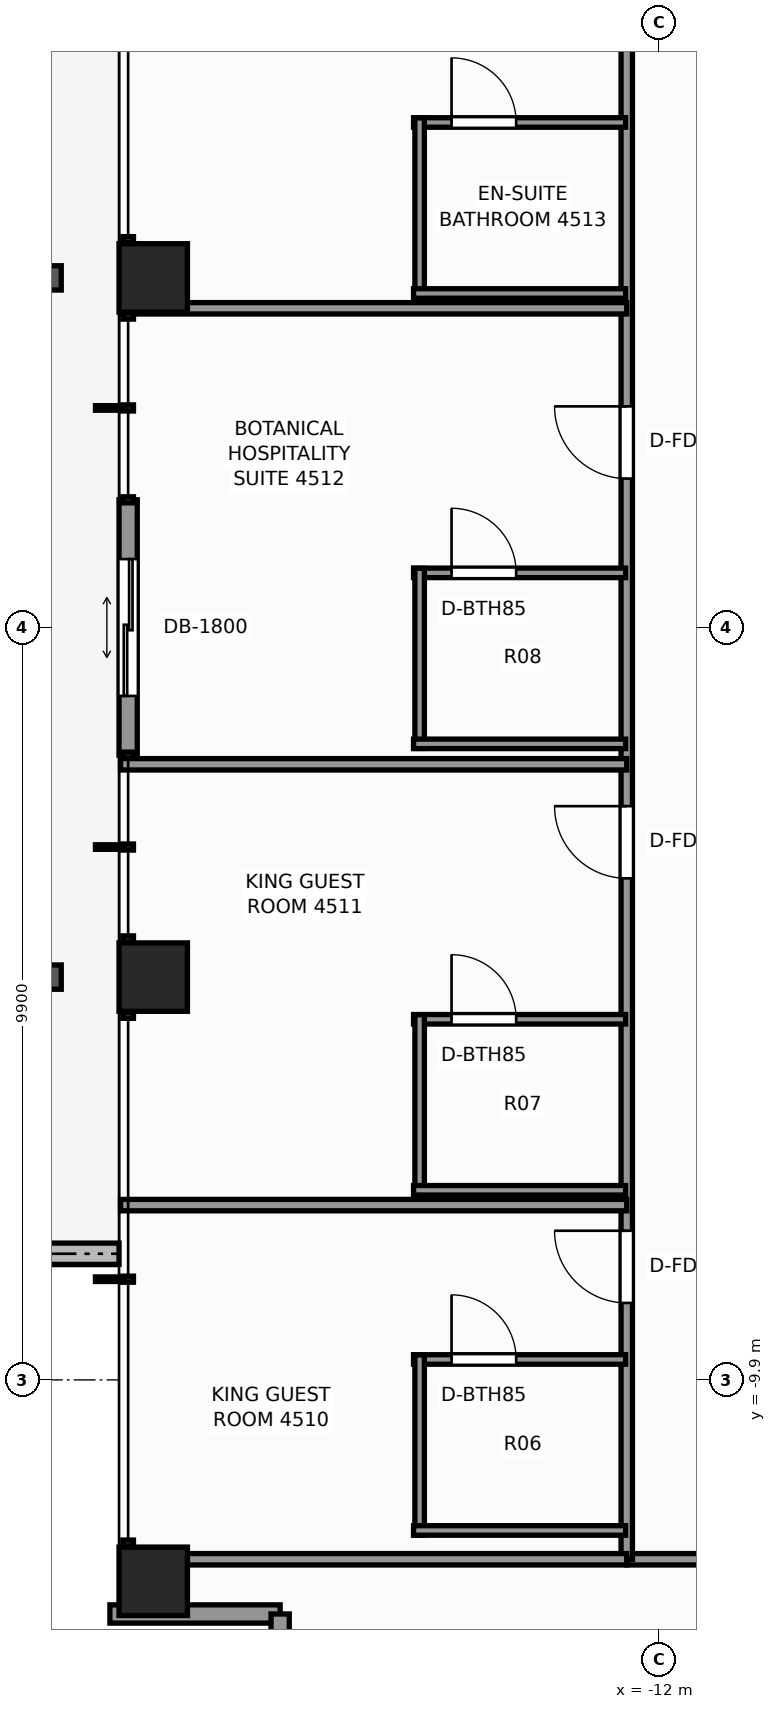
"""IFC4 building model, lengths in metres.
Left out: names, types, materials, properties, quantities, classifications, styles, units other than length and angle.
Written with IfcOpenShell. Run it as: python <this file> out.ifc"""

import sys

from ifc_helpers import new_model, si_unit, direction, frame, frame_2d, origin, origin_2d, place, context, subcontext, project, spatial, rectangle, extrude, element, fill, save


model = new_model("IFC4")
c1 = context("Model", 3, precision=1e-05, world=origin(), true_north=direction((0.0, 1.0)))
c2 = subcontext(c1, "Body", "Model", "MODEL_VIEW")
j1 = project(units=[si_unit("LENGTHUNIT", "METRE"), si_unit("PLANEANGLEUNIT", "RADIAN")], contexts=[c1])
p1 = place(None, origin())
s1 = spatial("IfcSite", under=j1, at=p1, CompositionType="ELEMENT")
p2 = place(p1, origin())
s2 = spatial("IfcBuilding", under=s1, at=p2, CompositionType="ELEMENT")
p3 = place(p2, frame((0.0, 0.0, 156.9)))
s3 = spatial("IfcBuildingStorey", under=s2, at=p3, CompositionType="ELEMENT", Elevation=156.9)
for number, where, z_axis, x_axis in (
    (1, (-18.65, -12.55, 0.0), (0.0, 0.0, 1.0), (1.0, 0.0, 0.0)),
    (2, (-18.65, -4.6, 0.0), (0.0, 0.0, 1.0), (1.0, 0.0, 0.0)),
    (3, (-18.65, 4.6, 0.0), (0.0, 0.0, 1.0), (1.0, 0.0, 0.0)),
):
    element("IfcColumn", number, at=place(p3, frame(where, z_axis=z_axis, x_axis=x_axis)), inside=s3, PredefinedType="COLUMN", context=c2, shape_type="SweptSolid", body=[
        extrude(rectangle(XDim=0.9, YDim=0.9, at=origin_2d()), origin(), (0.0, 0.0, 1.0), 3.3),
    ])
p4 = place(p3, frame((-20.36, -8.24, -0.02), z_axis=(0.0, 0.0, 1.0), x_axis=(1.0, 0.0, 0.0)))
e4 = element("IfcWall", 4, at=p4, inside=s3, PredefinedType="PARAPET", context=c2, shape_type="SweptSolid", body=[
    extrude(rectangle(XDim=1.26, YDim=0.28, at=frame_2d((0.63, 0.0))), origin(), (0.0, 0.0, 1.0), 0.42),
])
p5 = place(p3, frame((-18.98, -1.68, 0.0), z_axis=(0.0, 0.0, 1.0), x_axis=(0.0, 1.0, 0.0)))
e5 = element("IfcWall", 5, at=p5, inside=s3, PredefinedType="STANDARD", context=c2, shape_type="SweptSolid", body=[
    extrude(rectangle(XDim=3.36, YDim=0.24, at=frame_2d((1.68, 0.0))), origin(), (0.0, 0.0, 1.0), 3.1),
])
p6 = place(p5, frame((0.78, 0.0, 0.0)))
e6 = element("IfcOpeningElement", 6, at=p6, cuts=e5, PredefinedType="OPENING", context=c2, shape_type="SweptSolid", body=[
    extrude(rectangle(XDim=1.8, YDim=2.2, at=frame_2d((0.9, 1.1))), frame((0.0, 0.13, 0.0), z_axis=(0.0, -1.0, 0.0), x_axis=(1.0, 0.0, 0.0)), (0.0, 0.0, 1.0), 0.26),
])
p7 = place(p3, frame((-16.98, -12.98, 0.0), z_axis=(0.0, 0.0, 1.0), x_axis=(-1.0, 0.0, 0.0)))
e7 = element("IfcWall", 7, at=p7, inside=s3, PredefinedType="STANDARD", context=c2, shape_type="SweptSolid", body=[
    extrude(rectangle(XDim=2.24, YDim=0.24, at=frame_2d((1.12, 0.0))), origin(), (0.0, 0.0, 1.0), 2.483),
])
p8 = place(p3, frame((-16.98, -15.22, 0.0), z_axis=(0.0, 0.0, 1.0), x_axis=(0.0, 1.0, 0.0)))
e8 = element("IfcWall", 8, at=p8, inside=s3, PredefinedType="STANDARD", context=c2, shape_type="SweptSolid", body=[
    extrude(rectangle(XDim=2.24, YDim=0.24, at=frame_2d((1.12, 0.0))), origin(), (0.0, 0.0, 1.0), 2.483),
])
p9 = place(p8, frame((0.45, 0.0, 0.65)))
e9 = element("IfcOpeningElement", 9, at=p9, cuts=e8, PredefinedType="OPENING", context=c2, shape_type="SweptSolid", body=[
    extrude(rectangle(XDim=1.1, YDim=1.45, at=frame_2d((0.55, 0.725))), frame((0.0, 0.13, 0.0), z_axis=(0.0, -1.0, 0.0), x_axis=(1.0, 0.0, 0.0)), (0.0, 0.0, 1.0), 0.26),
])
p10 = place(p3, frame((-12.42, -12.26, 0.0), z_axis=(0.0, 0.0, 1.0), x_axis=(1.0, 0.0, 0.0)))
e10 = element("IfcWall", 10, at=p10, inside=s3, PredefinedType="PARTITIONING", context=c2, shape_type="SweptSolid", body=[
    extrude(rectangle(XDim=24.84, YDim=0.15, at=frame_2d((12.42, 0.0))), origin(), (0.0, 0.0, 1.0), 2.389),
])
p11 = place(p10, frame((3.542, 0.0, 0.0)))
e11 = element("IfcOpeningElement", 11, at=p11, cuts=e10, PredefinedType="OPENING", context=c2, shape_type="SweptSolid", body=[
    extrude(rectangle(XDim=0.9, YDim=2.06, at=frame_2d((0.45, 1.03))), frame((0.0, 0.085, 0.0), z_axis=(0.0, -1.0, 0.0), x_axis=(1.0, 0.0, 0.0)), (0.0, 0.0, 1.0), 0.17),
])
p12 = place(p10, frame((5.877, 0.0, 0.0)))
e12 = element("IfcOpeningElement", 12, at=p12, cuts=e10, PredefinedType="OPENING", context=c2, shape_type="SweptSolid", body=[
    extrude(rectangle(XDim=0.9, YDim=2.06, at=frame_2d((0.45, 1.03))), frame((0.0, 0.085, 0.0), z_axis=(0.0, -1.0, 0.0), x_axis=(1.0, 0.0, 0.0)), (0.0, 0.0, 1.0), 0.17),
])
p13 = place(p10, frame((9.693, 0.0, 0.0)))
e13 = element("IfcOpeningElement", 13, at=p13, cuts=e10, PredefinedType="OPENING", context=c2, shape_type="SweptSolid", body=[
    extrude(rectangle(XDim=0.9, YDim=2.06, at=frame_2d((0.45, 1.03))), frame((0.0, 0.085, 0.0), z_axis=(0.0, -1.0, 0.0), x_axis=(1.0, 0.0, 0.0)), (0.0, 0.0, 1.0), 0.17),
])
p14 = place(p10, frame((13.308, 0.0, 0.0)))
e14 = element("IfcOpeningElement", 14, at=p14, cuts=e10, PredefinedType="OPENING", context=c2, shape_type="SweptSolid", body=[
    extrude(rectangle(XDim=0.95, YDim=2.06, at=frame_2d((0.475, 1.03))), frame((0.0, 0.085, 0.0), z_axis=(0.0, -1.0, 0.0), x_axis=(1.0, 0.0, 0.0)), (0.0, 0.0, 1.0), 0.17),
])
p15 = place(p10, frame((18.063, 0.0, 0.0)))
e15 = element("IfcOpeningElement", 15, at=p15, cuts=e10, PredefinedType="OPENING", context=c2, shape_type="SweptSolid", body=[
    extrude(rectangle(XDim=0.9, YDim=2.06, at=frame_2d((0.45, 1.03))), frame((0.0, 0.085, 0.0), z_axis=(0.0, -1.0, 0.0), x_axis=(1.0, 0.0, 0.0)), (0.0, 0.0, 1.0), 0.17),
])
p16 = place(p10, frame((20.259, 0.0, 0.0)))
e16 = element("IfcOpeningElement", 16, at=p16, cuts=e10, PredefinedType="OPENING", context=c2, shape_type="SweptSolid", body=[
    extrude(rectangle(XDim=0.95, YDim=2.06, at=frame_2d((0.475, 1.03))), frame((0.0, 0.085, 0.0), z_axis=(0.0, -1.0, 0.0), x_axis=(1.0, 0.0, 0.0)), (0.0, 0.0, 1.0), 0.17),
])
p17 = place(p3, frame((-12.42, -12.26, 0.0), z_axis=(0.0, 0.0, 1.0), x_axis=(0.0, 1.0, 0.0)))
e17 = element("IfcWall", 17, at=p17, inside=s3, PredefinedType="PARTITIONING", context=c2, shape_type="SweptSolid", body=[
    extrude(rectangle(XDim=24.84, YDim=0.15, at=frame_2d((12.42, 0.0))), origin(), (0.0, 0.0, 1.0), 2.389),
])
p18 = place(p17, frame((3.373, 0.0, 0.0)))
e18 = element("IfcOpeningElement", 18, at=p18, cuts=e17, PredefinedType="OPENING", context=c2, shape_type="SweptSolid", body=[
    extrude(rectangle(XDim=0.95, YDim=2.06, at=frame_2d((0.475, 1.03))), frame((0.0, 0.085, 0.0), z_axis=(0.0, -1.0, 0.0), x_axis=(1.0, 0.0, 0.0)), (0.0, 0.0, 1.0), 0.17),
])
p19 = place(p17, frame((8.959, 0.0, 0.0)))
e19 = element("IfcOpeningElement", 19, at=p19, cuts=e17, PredefinedType="OPENING", context=c2, shape_type="SweptSolid", body=[
    extrude(rectangle(XDim=0.95, YDim=2.06, at=frame_2d((0.475, 1.03))), frame((0.0, 0.085, 0.0), z_axis=(0.0, -1.0, 0.0), x_axis=(1.0, 0.0, 0.0)), (0.0, 0.0, 1.0), 0.17),
])
p20 = place(p17, frame((14.219, 0.0, 0.0)))
e20 = element("IfcOpeningElement", 20, at=p20, cuts=e17, PredefinedType="OPENING", context=c2, shape_type="SweptSolid", body=[
    extrude(rectangle(XDim=0.95, YDim=2.06, at=frame_2d((0.475, 1.03))), frame((0.0, 0.085, 0.0), z_axis=(0.0, -1.0, 0.0), x_axis=(1.0, 0.0, 0.0)), (0.0, 0.0, 1.0), 0.17),
])
p21 = place(p17, frame((20.117, 0.0, 0.0)))
e21 = element("IfcOpeningElement", 21, at=p21, cuts=e17, PredefinedType="OPENING", context=c2, shape_type="SweptSolid", body=[
    extrude(rectangle(XDim=0.95, YDim=2.06, at=frame_2d((0.475, 1.03))), frame((0.0, 0.085, 0.0), z_axis=(0.0, -1.0, 0.0), x_axis=(1.0, 0.0, 0.0)), (0.0, 0.0, 1.0), 0.17),
])
p22 = place(p3, frame((-19.08, -12.26, 0.0), z_axis=(0.0, 0.0, 1.0), x_axis=(1.0, 0.0, 0.0)))
e22 = element("IfcWall", 22, at=p22, inside=s3, PredefinedType="PARTITIONING", context=c2, shape_type="SweptSolid", body=[
    extrude(rectangle(XDim=6.66, YDim=0.15, at=frame_2d((3.33, 0.0))), origin(), (0.0, 0.0, 1.0), 2.389),
])
p23 = place(p3, frame((-19.08, -7.6, 0.0), z_axis=(0.0, 0.0, 1.0), x_axis=(1.0, 0.0, 0.0)))
e23 = element("IfcWall", 23, at=p23, inside=s3, PredefinedType="PARTITIONING", context=c2, shape_type="SweptSolid", body=[
    extrude(rectangle(XDim=6.66, YDim=0.15, at=frame_2d((3.33, 0.0))), origin(), (0.0, 0.0, 1.0), 2.473),
])
p24 = place(p3, frame((-15.225, -9.631, 0.0), z_axis=(0.0, 0.0, 1.0), x_axis=(1.0, 0.0, 0.0)))
e24 = element("IfcWall", 24, at=p24, inside=s3, PredefinedType="PARTITIONING", context=c2, shape_type="SweptSolid", body=[
    extrude(rectangle(XDim=2.79, YDim=0.125, at=frame_2d((1.395, 0.0))), origin(), (0.0, 0.0, 1.0), 3.1),
])
p25 = place(p24, frame((0.5, 0.0, 0.0)))
e25 = element("IfcOpeningElement", 25, at=p25, cuts=e24, PredefinedType="OPENING", context=c2, shape_type="SweptSolid", body=[
    extrude(rectangle(XDim=0.85, YDim=2.03, at=frame_2d((0.425, 1.015))), frame((0.0, 0.073, 0.0), z_axis=(0.0, -1.0, 0.0), x_axis=(1.0, 0.0, 0.0)), (0.0, 0.0, 1.0), 0.145),
])
p26 = place(p3, frame((-15.145, -11.941, 0.0), z_axis=(0.0, 0.0, 1.0), x_axis=(0.0, 1.0, 0.0)))
e26 = element("IfcWall", 26, at=p26, inside=s3, PredefinedType="PARTITIONING", context=c2, shape_type="SweptSolid", body=[
    extrude(rectangle(XDim=2.37, YDim=0.125, at=frame_2d((1.185, 0.0))), origin(), (0.0, 0.0, 1.0), 2.389),
])
p27 = place(p3, frame((-15.225, -11.881, 0.0), z_axis=(0.0, 0.0, 1.0), x_axis=(1.0, 0.0, 0.0)))
e27 = element("IfcWall", 27, at=p27, inside=s3, PredefinedType="PARTITIONING", context=c2, shape_type="SweptSolid", body=[
    extrude(rectangle(XDim=2.79, YDim=0.125, at=frame_2d((1.395, 0.0))), origin(), (0.0, 0.0, 1.0), 3.1),
])
p28 = place(p3, frame((-19.08, -1.8, 0.0), z_axis=(0.0, 0.0, 1.0), x_axis=(1.0, 0.0, 0.0)))
e28 = element("IfcWall", 28, at=p28, inside=s3, PredefinedType="PARTITIONING", context=c2, shape_type="SweptSolid", body=[
    extrude(rectangle(XDim=6.66, YDim=0.15, at=frame_2d((3.33, 0.0))), origin(), (0.0, 0.0, 1.0), 2.473),
])
p29 = place(p3, frame((-15.225, -5.155, 0.0), z_axis=(0.0, 0.0, 1.0), x_axis=(1.0, 0.0, 0.0)))
e29 = element("IfcWall", 29, at=p29, inside=s3, PredefinedType="PARTITIONING", context=c2, shape_type="SweptSolid", body=[
    extrude(rectangle(XDim=2.79, YDim=0.125, at=frame_2d((1.395, 0.0))), origin(), (0.0, 0.0, 1.0), 3.1),
])
p30 = place(p29, frame((0.5, 0.0, 0.0)))
e30 = element("IfcOpeningElement", 30, at=p30, cuts=e29, PredefinedType="OPENING", context=c2, shape_type="SweptSolid", body=[
    extrude(rectangle(XDim=0.85, YDim=2.03, at=frame_2d((0.425, 1.015))), frame((0.0, 0.073, 0.0), z_axis=(0.0, -1.0, 0.0), x_axis=(1.0, 0.0, 0.0)), (0.0, 0.0, 1.0), 0.145),
])
p31 = place(p3, frame((-15.145, -7.465, 0.0), z_axis=(0.0, 0.0, 1.0), x_axis=(0.0, 1.0, 0.0)))
e31 = element("IfcWall", 31, at=p31, inside=s3, PredefinedType="PARTITIONING", context=c2, shape_type="SweptSolid", body=[
    extrude(rectangle(XDim=2.37, YDim=0.125, at=frame_2d((1.185, 0.0))), origin(), (0.0, 0.0, 1.0), 3.1),
])
p32 = place(p3, frame((-15.225, -7.405, 0.0), z_axis=(0.0, 0.0, 1.0), x_axis=(1.0, 0.0, 0.0)))
e32 = element("IfcWall", 32, at=p32, inside=s3, PredefinedType="PARTITIONING", context=c2, shape_type="SweptSolid", body=[
    extrude(rectangle(XDim=2.79, YDim=0.125, at=frame_2d((1.395, 0.0))), origin(), (0.0, 0.0, 1.0), 3.1),
])
p33 = place(p3, frame((-19.08, 4.2, 0.0), z_axis=(0.0, 0.0, 1.0), x_axis=(1.0, 0.0, 0.0)))
e33 = element("IfcWall", 33, at=p33, inside=s3, PredefinedType="PARTITIONING", context=c2, shape_type="SweptSolid", body=[
    extrude(rectangle(XDim=6.66, YDim=0.15, at=frame_2d((3.33, 0.0))), origin(), (0.0, 0.0, 1.0), 2.473),
])
p34 = place(p3, frame((-15.225, 0.719, 0.0), z_axis=(0.0, 0.0, 1.0), x_axis=(1.0, 0.0, 0.0)))
e34 = element("IfcWall", 34, at=p34, inside=s3, PredefinedType="PARTITIONING", context=c2, shape_type="SweptSolid", body=[
    extrude(rectangle(XDim=2.79, YDim=0.125, at=frame_2d((1.395, 0.0))), origin(), (0.0, 0.0, 1.0), 3.1),
])
p35 = place(p34, frame((0.5, 0.0, 0.0)))
e35 = element("IfcOpeningElement", 35, at=p35, cuts=e34, PredefinedType="OPENING", context=c2, shape_type="SweptSolid", body=[
    extrude(rectangle(XDim=0.85, YDim=2.03, at=frame_2d((0.425, 1.015))), frame((0.0, 0.073, 0.0), z_axis=(0.0, -1.0, 0.0), x_axis=(1.0, 0.0, 0.0)), (0.0, 0.0, 1.0), 0.145),
])
p36 = place(p3, frame((-15.145, -1.591, 0.0), z_axis=(0.0, 0.0, 1.0), x_axis=(0.0, 1.0, 0.0)))
e36 = element("IfcWall", 36, at=p36, inside=s3, PredefinedType="PARTITIONING", context=c2, shape_type="SweptSolid", body=[
    extrude(rectangle(XDim=2.37, YDim=0.125, at=frame_2d((1.185, 0.0))), origin(), (0.0, 0.0, 1.0), 2.625),
])
p37 = place(p3, frame((-15.225, -1.531, 0.0), z_axis=(0.0, 0.0, 1.0), x_axis=(1.0, 0.0, 0.0)))
e37 = element("IfcWall", 37, at=p37, inside=s3, PredefinedType="PARTITIONING", context=c2, shape_type="SweptSolid", body=[
    extrude(rectangle(XDim=2.79, YDim=0.125, at=frame_2d((1.395, 0.0))), origin(), (0.0, 0.0, 1.0), 3.1),
])
p38 = place(p3, frame((-15.225, 6.645, 0.0), z_axis=(0.0, 0.0, 1.0), x_axis=(1.0, 0.0, 0.0)))
e38 = element("IfcWall", 38, at=p38, inside=s3, PredefinedType="PARTITIONING", context=c2, shape_type="SweptSolid", body=[
    extrude(rectangle(XDim=2.79, YDim=0.125, at=frame_2d((1.395, 0.0))), origin(), (0.0, 0.0, 1.0), 3.1),
])
p39 = place(p38, frame((0.5, 0.0, 0.0)))
e39 = element("IfcOpeningElement", 39, at=p39, cuts=e38, PredefinedType="OPENING", context=c2, shape_type="SweptSolid", body=[
    extrude(rectangle(XDim=0.85, YDim=2.03, at=frame_2d((0.425, 1.015))), frame((0.0, 0.073, 0.0), z_axis=(0.0, -1.0, 0.0), x_axis=(1.0, 0.0, 0.0)), (0.0, 0.0, 1.0), 0.145),
])
p40 = place(p3, frame((-15.145, 4.335, 0.0), z_axis=(0.0, 0.0, 1.0), x_axis=(0.0, 1.0, 0.0)))
e40 = element("IfcWall", 40, at=p40, inside=s3, PredefinedType="PARTITIONING", context=c2, shape_type="SweptSolid", body=[
    extrude(rectangle(XDim=2.37, YDim=0.125, at=frame_2d((1.185, 0.0))), origin(), (0.0, 0.0, 1.0), 2.389),
])
p41 = place(p3, frame((-15.225, 4.395, 0.0), z_axis=(0.0, 0.0, 1.0), x_axis=(1.0, 0.0, 0.0)))
e41 = element("IfcWall", 41, at=p41, inside=s3, PredefinedType="PARTITIONING", context=c2, shape_type="SweptSolid", body=[
    extrude(rectangle(XDim=2.79, YDim=0.125, at=frame_2d((1.395, 0.0))), origin(), (0.0, 0.0, 1.0), 2.389),
])
p42 = place(p6, origin())
e42 = element("IfcDoor", 42, at=p42, inside=s3, OperationType="DOUBLE_DOOR_SLIDING", PredefinedType="DOOR", context=c2, shape_type="SweptSolid", body=[
    extrude(rectangle(XDim=1.8, YDim=2.2, at=frame_2d((0.9, 1.1))), frame((0.0, 0.025, 0.0), z_axis=(0.0, -1.0, 0.0), x_axis=(1.0, 0.0, 0.0)), (0.0, 0.0, 1.0), 0.05),
])
fill(e6, e42)
p43 = place(p25, origin())
e43 = element("IfcDoor", 43, at=p43, inside=s3, OperationType="SINGLE_SWING_LEFT", PredefinedType="DOOR", context=c2, shape_type="SweptSolid", body=[
    extrude(rectangle(XDim=0.85, YDim=2.03, at=frame_2d((0.425, 1.015))), frame((0.0, 0.025, 0.0), z_axis=(0.0, -1.0, 0.0), x_axis=(1.0, 0.0, 0.0)), (0.0, 0.0, 1.0), 0.05),
])
fill(e25, e43)
p44 = place(p18, origin())
e44 = element("IfcDoor", 44, at=p44, inside=s3, OperationType="SINGLE_SWING_RIGHT", PredefinedType="DOOR", context=c2, shape_type="SweptSolid", body=[
    extrude(rectangle(XDim=0.95, YDim=2.06, at=frame_2d((0.475, 1.03))), frame((0.0, 0.025, 0.0), z_axis=(0.0, -1.0, 0.0), x_axis=(1.0, 0.0, 0.0)), (0.0, 0.0, 1.0), 0.05),
])
fill(e18, e44)
p45 = place(p30, origin())
e45 = element("IfcDoor", 45, at=p45, inside=s3, OperationType="SINGLE_SWING_LEFT", PredefinedType="DOOR", context=c2, shape_type="SweptSolid", body=[
    extrude(rectangle(XDim=0.85, YDim=2.03, at=frame_2d((0.425, 1.015))), frame((0.0, 0.025, 0.0), z_axis=(0.0, -1.0, 0.0), x_axis=(1.0, 0.0, 0.0)), (0.0, 0.0, 1.0), 0.05),
])
fill(e30, e45)
p46 = place(p19, origin())
e46 = element("IfcDoor", 46, at=p46, inside=s3, OperationType="SINGLE_SWING_RIGHT", PredefinedType="DOOR", context=c2, shape_type="SweptSolid", body=[
    extrude(rectangle(XDim=0.95, YDim=2.06, at=frame_2d((0.475, 1.03))), frame((0.0, 0.025, 0.0), z_axis=(0.0, -1.0, 0.0), x_axis=(1.0, 0.0, 0.0)), (0.0, 0.0, 1.0), 0.05),
])
fill(e19, e46)
p47 = place(p35, origin())
e47 = element("IfcDoor", 47, at=p47, inside=s3, OperationType="SINGLE_SWING_LEFT", PredefinedType="DOOR", context=c2, shape_type="SweptSolid", body=[
    extrude(rectangle(XDim=0.85, YDim=2.03, at=frame_2d((0.425, 1.015))), frame((0.0, 0.025, 0.0), z_axis=(0.0, -1.0, 0.0), x_axis=(1.0, 0.0, 0.0)), (0.0, 0.0, 1.0), 0.05),
])
fill(e35, e47)
p48 = place(p20, origin())
e48 = element("IfcDoor", 48, at=p48, inside=s3, OperationType="SINGLE_SWING_RIGHT", PredefinedType="DOOR", context=c2, shape_type="SweptSolid", body=[
    extrude(rectangle(XDim=0.95, YDim=2.06, at=frame_2d((0.475, 1.03))), frame((0.0, 0.025, 0.0), z_axis=(0.0, -1.0, 0.0), x_axis=(1.0, 0.0, 0.0)), (0.0, 0.0, 1.0), 0.05),
])
fill(e20, e48)
p49 = place(p39, origin())
e49 = element("IfcDoor", 49, at=p49, inside=s3, OperationType="SINGLE_SWING_LEFT", PredefinedType="DOOR", context=c2, shape_type="SweptSolid", body=[
    extrude(rectangle(XDim=0.85, YDim=2.03, at=frame_2d((0.425, 1.015))), frame((0.0, 0.025, 0.0), z_axis=(0.0, -1.0, 0.0), x_axis=(1.0, 0.0, 0.0)), (0.0, 0.0, 1.0), 0.05),
])
fill(e39, e49)
save(model, sys.argv[1])
